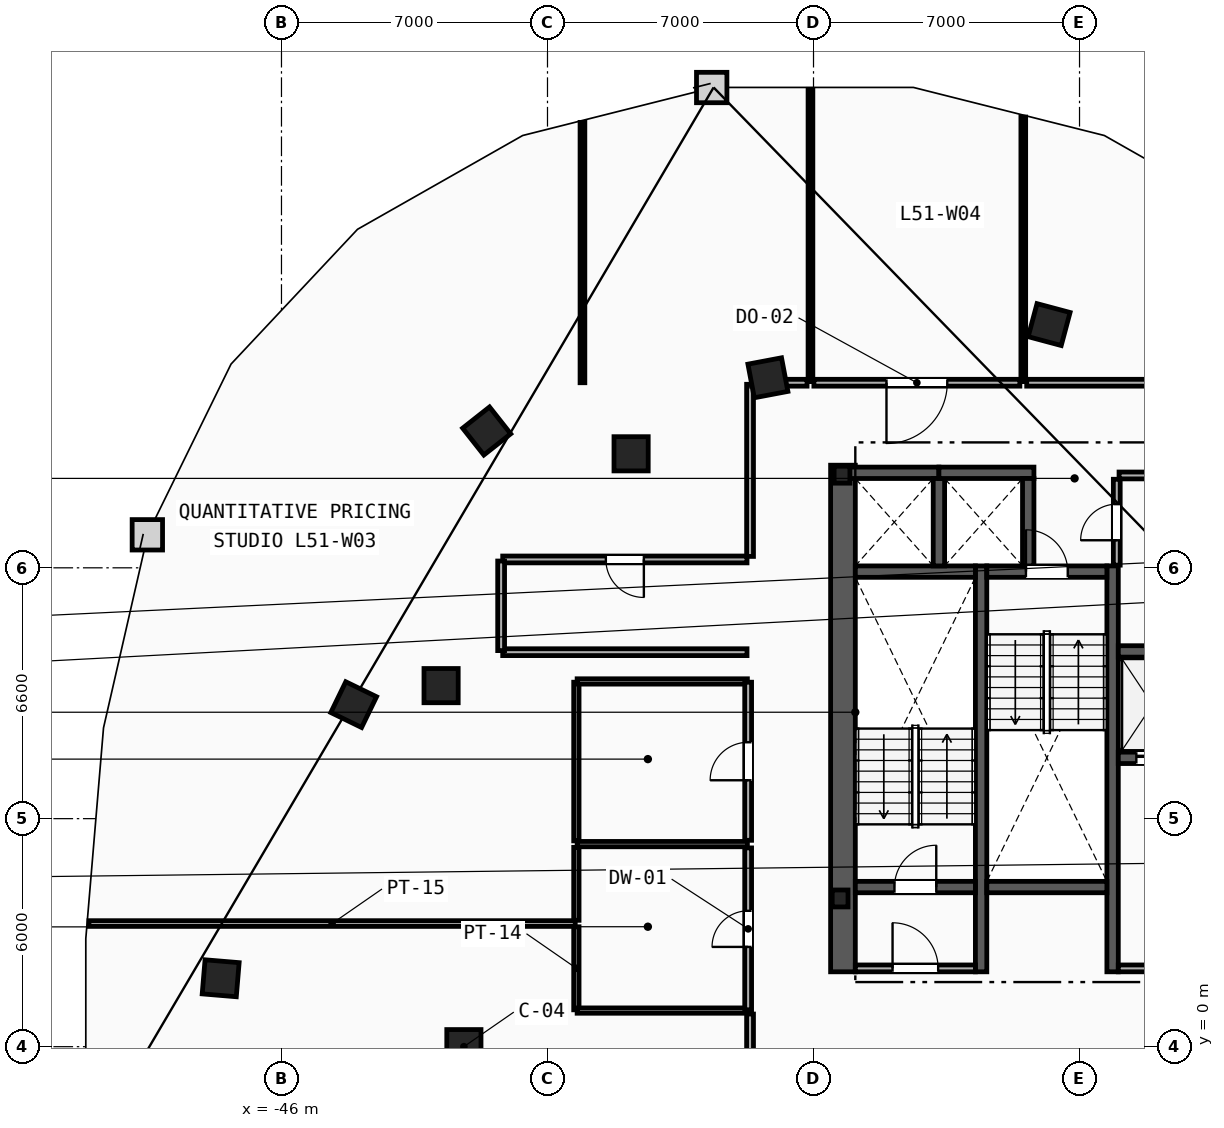
"""IFC4 building model, lengths in metres.
Left out: names, types, materials, properties, quantities, classifications, styles, units other than length and angle.
Written with IfcOpenShell. Run it as: python <this file> out.ifc"""

import sys

from ifc_helpers import new_model, si_unit, direction, frame, frame_2d, origin, origin_2d, place, context, subcontext, project, spatial, rectangle, i_section, extrude, element, fill, save


model = new_model("IFC4")
c1 = context("Model", 3, precision=1e-05, world=origin(), true_north=direction((0.0, 1.0)))
c2 = subcontext(c1, "Body", "Model", "MODEL_VIEW")
j1 = project(units=[si_unit("LENGTHUNIT", "METRE"), si_unit("PLANEANGLEUNIT", "RADIAN")], contexts=[c1])
p1 = place(None, origin())
s1 = spatial("IfcSite", under=j1, at=p1, CompositionType="ELEMENT")
p2 = place(p1, origin())
s2 = spatial("IfcBuilding", under=s1, at=p2, CompositionType="ELEMENT")
p3 = place(p2, frame((0.0, 0.0, 195.4)))
s3 = spatial("IfcBuildingStorey", under=s2, at=p3, CompositionType="ELEMENT", Elevation=195.4)
for number, where, z_axis, x_axis in (
    (1, (-31.3, 3.9, 0.0), (0.0, 0.0, 1.0), (1.0, 0.0, 0.0)),
    (2, (-31.25, 15.05, 0.0), (0.0, 0.0, 1.0), (1.0, 0.0, 0.0)),
):
    element("IfcColumn", number, at=place(p3, frame(where, z_axis=z_axis, x_axis=x_axis)), inside=s3, PredefinedType="COLUMN", context=c2, shape_type="SweptSolid", body=[
        extrude(i_section(OverallWidth=0.416, OverallDepth=0.446, WebThickness=0.039, FlangeThickness=0.063, FilletRadius=0.018, at=origin_2d()), origin(), (0.0, 0.0, 1.0), 3.6),
    ])
for number, where, z_axis, x_axis in (
    (3, (-41.2, 0.0, 0.0), (0.0, 0.0, 1.0), (1.0, 0.0, 0.0)),
    (4, (-41.8, 9.5, 0.0), (0.0, 0.0, 1.0), (1.0, 0.0, 0.0)),
    (5, (-36.8, 15.6, 0.0), (0.0, 0.0, 1.0), (1.0, 0.0, 0.0)),
    (6, (-25.8, 19.0, 0.0), (0.0, 0.0, 1.0), (-0.966, 0.259, 0.0)),
    (7, (-33.2, 17.6, 0.0), (0.0, 0.0, 1.0), (-0.983, -0.186, 0.0)),
    (8, (-40.6, 16.2, 0.0), (0.0, 0.0, 1.0), (-0.785, -0.619, 0.0)),
    (9, (-44.1, 9.0, 0.0), (0.0, 0.0, 1.0), (-0.437, -0.899, 0.0)),
    (10, (-47.6, 1.8, 0.0), (0.0, 0.0, 1.0), (-0.084, -0.997, 0.0)),
):
    element("IfcColumn", number, at=place(p3, frame(where, z_axis=z_axis, x_axis=x_axis)), inside=s3, PredefinedType="COLUMN", context=c2, shape_type="SweptSolid", body=[
        extrude(rectangle(XDim=0.9, YDim=0.9, at=origin_2d()), origin(), (0.0, 0.0, 1.0), 3.6),
    ])
p4 = place(p3, frame((-31.225, 1.97, 0.0), z_axis=(0.0, 0.0, 1.0), x_axis=(0.0, 1.0, 0.0)))
e11 = element("IfcWall", 11, at=p4, inside=s3, PredefinedType="SHEAR", context=c2, shape_type="SweptSolid", body=[
    extrude(rectangle(XDim=13.33, YDim=0.65, at=frame_2d((6.665, 0.0))), origin(), (0.0, 0.0, 1.0), 3.34),
])
for number, where, z_axis, x_axis in (
    (12, (-27.59, 1.97, 0.0), (0.0, 0.0, 1.0), (0.0, 1.0, 0.0)),
    (13, (-24.13, 1.97, 0.0), (0.0, 0.0, 1.0), (0.0, 1.0, 0.0)),
):
    element("IfcWall", number, at=place(p3, frame(where, z_axis=z_axis, x_axis=x_axis)), inside=s3, PredefinedType="SHEAR", context=c2, shape_type="SweptSolid", body=[
        extrude(rectangle(XDim=10.68, YDim=0.3, at=frame_2d((5.34, 0.0))), origin(), (0.0, 0.0, 1.0), 3.34),
    ])
p5 = place(p3, frame((-30.9, 4.2, 0.0), z_axis=(0.0, 0.0, 1.0), x_axis=(1.0, 0.0, 0.0)))
e14 = element("IfcWall", 14, at=p5, inside=s3, PredefinedType="SHEAR", context=c2, shape_type="SweptSolid", body=[
    extrude(rectangle(XDim=3.16, YDim=0.3, at=frame_2d((1.58, 0.0))), origin(), (0.0, 0.0, 1.0), 3.34),
])
p6 = place(p5, frame((1.03, 0.0, 0.0)))
e15 = element("IfcOpeningElement", 15, at=p6, cuts=e14, PredefinedType="OPENING", context=c2, shape_type="SweptSolid", body=[
    extrude(rectangle(XDim=1.1, YDim=2.15, at=frame_2d((0.55, 1.075))), frame((0.0, 0.16, 0.0), z_axis=(0.0, -1.0, 0.0), x_axis=(1.0, 0.0, 0.0)), (0.0, 0.0, 1.0), 0.32),
])
p7 = place(p3, frame((-30.9, 12.5, 0.0), z_axis=(0.0, 0.0, 1.0), x_axis=(1.0, 0.0, 0.0)))
e16 = element("IfcWall", 16, at=p7, inside=s3, PredefinedType="SHEAR", context=c2, shape_type="SweptSolid", body=[
    extrude(rectangle(XDim=3.16, YDim=0.3, at=frame_2d((1.58, 0.0))), origin(), (0.0, 0.0, 1.0), 3.34),
])
p8 = place(p3, frame((-27.44, 12.5, 0.0), z_axis=(0.0, 0.0, 1.0), x_axis=(1.0, 0.0, 0.0)))
e17 = element("IfcWall", 17, at=p8, inside=s3, PredefinedType="SHEAR", context=c2, shape_type="SweptSolid", body=[
    extrude(rectangle(XDim=3.16, YDim=0.3, at=frame_2d((1.58, 0.0))), origin(), (0.0, 0.0, 1.0), 3.34),
])
p9 = place(p8, frame((1.03, 0.0, 0.0)))
e18 = element("IfcOpeningElement", 18, at=p9, cuts=e17, PredefinedType="OPENING", context=c2, shape_type="SweptSolid", body=[
    extrude(rectangle(XDim=1.1, YDim=2.15, at=frame_2d((0.55, 1.075))), frame((0.0, 0.16, 0.0), z_axis=(0.0, -1.0, 0.0), x_axis=(1.0, 0.0, 0.0)), (0.0, 0.0, 1.0), 0.32),
])
p10 = place(p3, frame((-27.44, 4.2, 0.0), z_axis=(0.0, 0.0, 1.0), x_axis=(1.0, 0.0, 0.0)))
e19 = element("IfcWall", 19, at=p10, inside=s3, PredefinedType="SHEAR", context=c2, shape_type="SweptSolid", body=[
    extrude(rectangle(XDim=3.16, YDim=0.3, at=frame_2d((1.58, 0.0))), origin(), (0.0, 0.0, 1.0), 3.34),
])
p11 = place(p3, frame((-23.98, 2.06, 0.0), z_axis=(0.0, 0.0, 1.0), x_axis=(1.0, 0.0, 0.0)))
e20 = element("IfcWall", 20, at=p11, inside=s3, PredefinedType="PARTITIONING", context=c2, shape_type="SweptSolid", body=[
    extrude(rectangle(XDim=3.0, YDim=0.18, at=frame_2d((1.5, 0.0))), origin(), (0.0, 0.0, 1.0), 3.34),
])
p12 = place(p11, frame((0.9, 0.0, 0.0)))
e21 = element("IfcOpeningElement", 21, at=p12, cuts=e20, PredefinedType="OPENING", context=c2, shape_type="SweptSolid", body=[
    extrude(rectangle(XDim=1.2, YDim=2.15, at=frame_2d((0.6, 1.075))), frame((0.0, 0.1, 0.0), z_axis=(0.0, -1.0, 0.0), x_axis=(1.0, 0.0, 0.0)), (0.0, 0.0, 1.0), 0.2),
])
p13 = place(p3, frame((-30.9, 2.06, 0.0), z_axis=(0.0, 0.0, 1.0), x_axis=(1.0, 0.0, 0.0)))
e22 = element("IfcWall", 22, at=p13, inside=s3, PredefinedType="PARTITIONING", context=c2, shape_type="SweptSolid", body=[
    extrude(rectangle(XDim=3.16, YDim=0.18, at=frame_2d((1.58, 0.0))), origin(), (0.0, 0.0, 1.0), 3.34),
])
p14 = place(p13, frame((0.98, 0.0, 0.0)))
e23 = element("IfcOpeningElement", 23, at=p14, cuts=e22, PredefinedType="OPENING", context=c2, shape_type="SweptSolid", body=[
    extrude(rectangle(XDim=1.2, YDim=2.15, at=frame_2d((0.6, 1.075))), frame((0.0, 0.1, 0.0), z_axis=(0.0, -1.0, 0.0), x_axis=(1.0, 0.0, 0.0)), (0.0, 0.0, 1.0), 0.2),
])
p15 = place(p3, frame((-23.98, 7.6, 0.0), z_axis=(0.0, 0.0, 1.0), x_axis=(1.0, 0.0, 0.0)))
e24 = element("IfcWall", 24, at=p15, inside=s3, PredefinedType="SHEAR", context=c2, shape_type="SweptSolid", body=[
    extrude(rectangle(XDim=2.1, YDim=0.3, at=frame_2d((1.05, 0.0))), origin(), (0.0, 0.0, 1.0), 3.34),
])
p16 = place(p15, frame((0.475, 0.0, 0.0)))
e25 = element("IfcOpeningElement", 25, at=p16, cuts=e24, PredefinedType="OPENING", context=c2, shape_type="SweptSolid", body=[
    extrude(rectangle(XDim=1.15, YDim=2.2, at=frame_2d((0.575, 1.1))), frame((0.0, 0.16, 0.0), z_axis=(0.0, -1.0, 0.0), x_axis=(1.0, 0.0, 0.0)), (0.0, 0.0, 1.0), 0.32),
])
p17 = place(p3, frame((-23.98, 10.4, 0.0), z_axis=(0.0, 0.0, 1.0), x_axis=(1.0, 0.0, 0.0)))
e26 = element("IfcWall", 26, at=p17, inside=s3, PredefinedType="SHEAR", context=c2, shape_type="SweptSolid", body=[
    extrude(rectangle(XDim=2.1, YDim=0.3, at=frame_2d((1.05, 0.0))), origin(), (0.0, 0.0, 1.0), 3.34),
])
p18 = place(p3, frame((-31.2, 15.1, 0.0), z_axis=(0.0, 0.0, 1.0), x_axis=(1.0, 0.0, 0.0)))
e27 = element("IfcWall", 27, at=p18, inside=s3, PredefinedType="SHEAR", context=c2, shape_type="SweptSolid", body=[
    extrude(rectangle(XDim=2.5, YDim=0.3, at=frame_2d((1.25, 0.0))), origin(), (0.0, 0.0, 1.0), 3.34),
])
p19 = place(p3, frame((-28.7, 12.65, 0.0), z_axis=(0.0, 0.0, 1.0), x_axis=(0.0, 1.0, 0.0)))
e28 = element("IfcWall", 28, at=p19, inside=s3, PredefinedType="SHEAR", context=c2, shape_type="SweptSolid", body=[
    extrude(rectangle(XDim=2.3, YDim=0.3, at=frame_2d((1.15, 0.0))), origin(), (0.0, 0.0, 1.0), 3.34),
])
p20 = place(p3, frame((-28.7, 15.1, 0.0), z_axis=(0.0, 0.0, 1.0), x_axis=(1.0, 0.0, 0.0)))
e29 = element("IfcWall", 29, at=p20, inside=s3, PredefinedType="SHEAR", context=c2, shape_type="SweptSolid", body=[
    extrude(rectangle(XDim=2.5, YDim=0.3, at=frame_2d((1.25, 0.0))), origin(), (0.0, 0.0, 1.0), 3.34),
])
p21 = place(p3, frame((-26.35, 12.65, 0.0), z_axis=(0.0, 0.0, 1.0), x_axis=(0.0, 1.0, 0.0)))
e30 = element("IfcWall", 30, at=p21, inside=s3, PredefinedType="SHEAR", context=c2, shape_type="SweptSolid", body=[
    extrude(rectangle(XDim=2.3, YDim=0.3, at=frame_2d((1.15, 0.0))), origin(), (0.0, 0.0, 1.0), 3.34),
])
p22 = place(p3, frame((-23.96, 15.03, 0.0), z_axis=(0.0, 0.0, 1.0), x_axis=(1.0, 0.0, 0.0)))
e31 = element("IfcWall", 31, at=p22, inside=s3, PredefinedType="PARTITIONING", context=c2, shape_type="SweptSolid", body=[
    extrude(rectangle(XDim=2.61, YDim=0.18, at=frame_2d((1.305, 0.0))), origin(), (0.0, 0.0, 1.0), 2.413),
])
p23 = place(p3, frame((-24.02, 12.67, 0.0), z_axis=(0.0, 0.0, 1.0), x_axis=(0.0, 1.0, 0.0)))
e32 = element("IfcWall", 32, at=p23, inside=s3, PredefinedType="PARTITIONING", context=c2, shape_type="SweptSolid", body=[
    extrude(rectangle(XDim=2.26, YDim=0.18, at=frame_2d((1.13, 0.0))), origin(), (0.0, 0.0, 1.0), 3.34),
])
p24 = place(p23, frame((0.655, 0.0, 0.0)))
e33 = element("IfcOpeningElement", 33, at=p24, cuts=e32, PredefinedType="OPENING", context=c2, shape_type="SweptSolid", body=[
    extrude(rectangle(XDim=0.95, YDim=2.1, at=frame_2d((0.475, 1.05))), frame((0.0, 0.1, 0.0), z_axis=(0.0, -1.0, 0.0), x_axis=(1.0, 0.0, 0.0)), (0.0, 0.0, 1.0), 0.2),
])
p25 = place(p3, frame((-38.24, 0.97, 0.0), z_axis=(0.0, 0.0, 1.0), x_axis=(0.0, 1.0, 0.0)))
e34 = element("IfcWall", 34, at=p25, inside=s3, PredefinedType="PARTITIONING", context=c2, shape_type="SweptSolid", body=[
    extrude(rectangle(XDim=2.185, YDim=0.14, at=frame_2d((1.093, 0.0))), origin(), (0.0, 0.0, 1.0), 3.34),
])
p26 = place(p3, frame((-38.24, 3.325, 0.0), z_axis=(0.0, 0.0, 1.0), x_axis=(0.0, 1.0, 0.0)))
e35 = element("IfcWall", 35, at=p26, inside=s3, PredefinedType="PARTITIONING", context=c2, shape_type="SweptSolid", body=[
    extrude(rectangle(XDim=1.92, YDim=0.14, at=frame_2d((0.96, 0.0))), origin(), (0.0, 0.0, 1.0), 3.34),
])
p27 = place(p3, frame((-38.24, 5.415, 0.0), z_axis=(0.0, 0.0, 1.0), x_axis=(0.0, 1.0, 0.0)))
e36 = element("IfcWall", 36, at=p27, inside=s3, PredefinedType="PARTITIONING", context=c2, shape_type="SweptSolid", body=[
    extrude(rectangle(XDim=4.175, YDim=0.14, at=frame_2d((2.087, 0.0))), origin(), (0.0, 0.0, 1.0), 3.34),
])
for number, where, z_axis, x_axis in (
    (37, (-38.22, 0.95, 0.0), (0.0, 0.0, 1.0), (1.0, 0.0, 0.0)),
    (38, (-38.22, 5.33, 0.0), (0.0, 0.0, 1.0), (1.0, 0.0, 0.0)),
    (39, (-38.22, 9.61, 0.0), (0.0, 0.0, 1.0), (1.0, 0.0, 0.0)),
):
    element("IfcWall", number, at=place(p3, frame(where, z_axis=z_axis, x_axis=x_axis)), inside=s3, PredefinedType="PARTITIONING", context=c2, shape_type="SweptSolid", body=[
        extrude(rectangle(XDim=4.48, YDim=0.14, at=frame_2d((2.24, 0.0))), origin(), (0.0, 0.0, 1.0), 3.34),
    ])
p28 = place(p3, frame((-33.72, 0.97, 0.0), z_axis=(0.0, 0.0, 1.0), x_axis=(0.0, 1.0, 0.0)))
e40 = element("IfcWall", 40, at=p28, inside=s3, PredefinedType="PARTITIONING", context=c2, shape_type="SweptSolid", body=[
    extrude(rectangle(XDim=4.26, YDim=0.18, at=frame_2d((2.13, 0.0))), origin(), (0.0, 0.0, 1.0), 3.34),
])
p29 = place(p28, frame((1.655, 0.0, 0.0)))
e41 = element("IfcOpeningElement", 41, at=p29, cuts=e40, PredefinedType="OPENING", context=c2, shape_type="SweptSolid", body=[
    extrude(rectangle(XDim=0.95, YDim=2.1, at=frame_2d((0.475, 1.05))), frame((0.0, 0.1, 0.0), z_axis=(0.0, -1.0, 0.0), x_axis=(1.0, 0.0, 0.0)), (0.0, 0.0, 1.0), 0.2),
])
p30 = place(p3, frame((-33.72, 5.43, 0.0), z_axis=(0.0, 0.0, 1.0), x_axis=(0.0, 1.0, 0.0)))
e42 = element("IfcWall", 42, at=p30, inside=s3, PredefinedType="PARTITIONING", context=c2, shape_type="SweptSolid", body=[
    extrude(rectangle(XDim=4.16, YDim=0.18, at=frame_2d((2.08, 0.0))), origin(), (0.0, 0.0, 1.0), 3.34),
])
p31 = place(p30, frame((1.58, 0.0, 0.0)))
e43 = element("IfcOpeningElement", 43, at=p31, cuts=e42, PredefinedType="OPENING", context=c2, shape_type="SweptSolid", body=[
    extrude(rectangle(XDim=1.0, YDim=2.15, at=frame_2d((0.5, 1.075))), frame((0.0, 0.1, 0.0), z_axis=(0.0, -1.0, 0.0), x_axis=(1.0, 0.0, 0.0)), (0.0, 0.0, 1.0), 0.2),
])
p32 = place(p3, frame((-51.066, 3.24, 0.0), z_axis=(0.0, 0.0, 1.0), x_axis=(1.0, 0.0, 0.0)))
e44 = element("IfcWall", 44, at=p32, inside=s3, PredefinedType="PARTITIONING", context=c2, shape_type="SweptSolid", body=[
    extrude(rectangle(XDim=12.796, YDim=0.15, at=frame_2d((6.398, 0.0))), origin(), (0.0, 0.0, 1.0), 3.34),
])
p33 = place(p3, frame((-38.08, 17.47, 0.0), z_axis=(0.0, 0.0, 1.0), x_axis=(0.0, 1.0, 0.0)))
e45 = element("IfcWall", 45, at=p33, inside=s3, PredefinedType="PARTITIONING", context=c2, shape_type="SweptSolid", body=[
    extrude(rectangle(XDim=6.85, YDim=0.125, at=frame_2d((3.425, 0.0))), origin(), (0.0, 0.0, 1.0), 3.34),
])
p34 = place(p3, frame((-32.08, 17.5, 0.0), z_axis=(0.0, 0.0, 1.0), x_axis=(0.0, 1.0, 0.0)))
e46 = element("IfcWall", 46, at=p34, inside=s3, PredefinedType="PARTITIONING", context=c2, shape_type="SweptSolid", body=[
    extrude(rectangle(XDim=7.69, YDim=0.125, at=frame_2d((3.845, 0.0))), origin(), (0.0, 0.0, 1.0), 3.34),
])
p35 = place(p3, frame((-26.48, 17.5, 0.0), z_axis=(0.0, 0.0, 1.0), x_axis=(0.0, 1.0, 0.0)))
e47 = element("IfcWall", 47, at=p35, inside=s3, PredefinedType="PARTITIONING", context=c2, shape_type="SweptSolid", body=[
    extrude(rectangle(XDim=6.961, YDim=0.125, at=frame_2d((3.48, 0.0))), origin(), (0.0, 0.0, 1.0), 3.34),
])
p36 = place(p3, frame((-33.67, 0.859, 0.0), z_axis=(0.0, 0.0, 1.0), x_axis=(0.0, -1.0, 0.0)))
e48 = element("IfcWall", 48, at=p36, inside=s3, PredefinedType="PARTITIONING", context=c2, shape_type="SweptSolid", body=[
    extrude(rectangle(XDim=1.187, YDim=0.18, at=frame_2d((0.594, 0.0))), origin(), (0.0, 0.0, 1.0), 3.34),
])
p37 = place(p3, frame((-16.822, 17.47, 0.0), z_axis=(0.0, 0.0, 1.0), x_axis=(-1.0, 0.0, 0.0)))
e49 = element("IfcWall", 49, at=p37, inside=s3, PredefinedType="PARTITIONING", context=c2, shape_type="SweptSolid", body=[
    extrude(rectangle(XDim=9.568, YDim=0.18, at=frame_2d((4.784, 0.0))), origin(), (0.0, 0.0, 1.0), 3.34),
])
p38 = place(p37, frame((4.284, 0.0, 0.0)))
e50 = element("IfcOpeningElement", 50, at=p38, cuts=e49, PredefinedType="OPENING", context=c2, shape_type="SweptSolid", body=[
    extrude(rectangle(XDim=1.0, YDim=2.15, at=frame_2d((0.5, 1.075))), frame((0.0, 0.1, 0.0), z_axis=(0.0, -1.0, 0.0), x_axis=(1.0, 0.0, 0.0)), (0.0, 0.0, 1.0), 0.2),
])
p39 = place(p3, frame((-33.75, 12.82, 0.0), z_axis=(0.0, 0.0, 1.0), x_axis=(-1.0, 0.0, 0.0)))
e51 = element("IfcWall", 51, at=p39, inside=s3, PredefinedType="PARTITIONING", context=c2, shape_type="SweptSolid", body=[
    extrude(rectangle(XDim=6.428, YDim=0.18, at=frame_2d((3.214, 0.0))), origin(), (0.0, 0.0, 1.0), 3.34),
])
p40 = place(p39, frame((2.714, 0.0, 0.0)))
e52 = element("IfcOpeningElement", 52, at=p40, cuts=e51, PredefinedType="OPENING", context=c2, shape_type="SweptSolid", body=[
    extrude(rectangle(XDim=1.0, YDim=2.15, at=frame_2d((0.5, 1.075))), frame((0.0, 0.1, 0.0), z_axis=(0.0, -1.0, 0.0), x_axis=(1.0, 0.0, 0.0)), (0.0, 0.0, 1.0), 0.2),
])
p41 = place(p3, frame((-40.178, 10.38, 0.0), z_axis=(0.0, 0.0, 1.0), x_axis=(1.0, 0.0, 0.0)))
e53 = element("IfcWall", 53, at=p41, inside=s3, PredefinedType="PARTITIONING", context=c2, shape_type="SweptSolid", body=[
    extrude(rectangle(XDim=6.428, YDim=0.18, at=frame_2d((3.214, 0.0))), origin(), (0.0, 0.0, 1.0), 3.34),
])
p42 = place(p3, frame((-33.67, 17.428, 0.0), z_axis=(0.0, 0.0, 1.0), x_axis=(0.0, -1.0, 0.0)))
e54 = element("IfcWall", 54, at=p42, inside=s3, PredefinedType="PARTITIONING", context=c2, shape_type="SweptSolid", body=[
    extrude(rectangle(XDim=4.529, YDim=0.18, at=frame_2d((2.264, 0.0))), origin(), (0.0, 0.0, 1.0), 3.34),
])
p43 = place(p3, frame((-40.22, 12.779, 0.0), z_axis=(0.0, 0.0, 1.0), x_axis=(0.0, -1.0, 0.0)))
e55 = element("IfcWall", 55, at=p43, inside=s3, PredefinedType="PARTITIONING", context=c2, shape_type="SweptSolid", body=[
    extrude(rectangle(XDim=2.357, YDim=0.18, at=frame_2d((1.179, 0.0))), origin(), (0.0, 0.0, 1.0), 3.34),
])
p44 = place(p3, frame((-32.17, 17.47, 0.0), z_axis=(0.0, 0.0, 1.0), x_axis=(-1.0, 0.0, 0.0)))
e56 = element("IfcWall", 56, at=p44, inside=s3, PredefinedType="PARTITIONING", context=c2, shape_type="SweptSolid", body=[
    extrude(rectangle(XDim=1.458, YDim=0.18, at=frame_2d((0.729, 0.0))), origin(), (0.0, 0.0, 1.0), 3.34),
])
p45 = place(p3, frame((-26.57, 17.47, 0.0), z_axis=(0.0, 0.0, 1.0), x_axis=(-1.0, 0.0, 0.0)))
e57 = element("IfcWall", 57, at=p45, inside=s3, PredefinedType="PARTITIONING", context=c2, shape_type="SweptSolid", body=[
    extrude(rectangle(XDim=5.42, YDim=0.18, at=frame_2d((2.71, 0.0))), origin(), (0.0, 0.0, 1.0), 3.34),
])
p46 = place(p45, frame((1.91, 0.0, 0.0)))
e58 = element("IfcOpeningElement", 58, at=p46, cuts=e57, PredefinedType="OPENING", context=c2, shape_type="SweptSolid", body=[
    extrude(rectangle(XDim=1.6, YDim=2.2, at=frame_2d((0.8, 1.1))), frame((0.0, 0.1, 0.0), z_axis=(0.0, -1.0, 0.0), x_axis=(1.0, 0.0, 0.0)), (0.0, 0.0, 1.0), 0.2),
])
p47 = place(p6, origin())
e59 = element("IfcDoor", 59, at=p47, inside=s3, OperationType="SINGLE_SWING_RIGHT", PredefinedType="DOOR", context=c2, shape_type="SweptSolid", body=[
    extrude(rectangle(XDim=1.1, YDim=2.15, at=frame_2d((0.55, 1.075))), frame((0.0, 0.025, 0.0), z_axis=(0.0, -1.0, 0.0), x_axis=(1.0, 0.0, 0.0)), (0.0, 0.0, 1.0), 0.05),
])
fill(e15, e59)
p48 = place(p9, origin())
e60 = element("IfcDoor", 60, at=p48, inside=s3, OperationType="SINGLE_SWING_LEFT", PredefinedType="DOOR", context=c2, shape_type="SweptSolid", body=[
    extrude(rectangle(XDim=1.1, YDim=2.15, at=frame_2d((0.55, 1.075))), frame((0.0, 0.025, 0.0), z_axis=(0.0, -1.0, 0.0), x_axis=(1.0, 0.0, 0.0)), (0.0, 0.0, 1.0), 0.05),
])
fill(e18, e60)
p49 = place(p14, origin())
e61 = element("IfcDoor", 61, at=p49, inside=s3, OperationType="SINGLE_SWING_LEFT", PredefinedType="DOOR", context=c2, shape_type="SweptSolid", body=[
    extrude(rectangle(XDim=1.2, YDim=2.15, at=frame_2d((0.6, 1.075))), frame((0.0, 0.025, 0.0), z_axis=(0.0, -1.0, 0.0), x_axis=(1.0, 0.0, 0.0)), (0.0, 0.0, 1.0), 0.05),
])
fill(e23, e61)
p50 = place(p16, origin())
e62 = element("IfcDoor", 62, at=p50, inside=s3, OperationType="SLIDING_TO_LEFT", PredefinedType="TRAPDOOR", context=c2, shape_type="SweptSolid", body=[
    extrude(rectangle(XDim=1.15, YDim=2.2, at=frame_2d((0.575, 1.1))), frame((0.0, 0.025, 0.0), z_axis=(0.0, -1.0, 0.0), x_axis=(1.0, 0.0, 0.0)), (0.0, 0.0, 1.0), 0.05),
])
fill(e25, e62)
p51 = place(p40, origin())
e63 = element("IfcDoor", 63, at=p51, inside=s3, OperationType="SINGLE_SWING_LEFT", PredefinedType="DOOR", context=c2, shape_type="SweptSolid", body=[
    extrude(rectangle(XDim=1.0, YDim=2.15, at=frame_2d((0.5, 1.075))), frame((0.0, 0.025, 0.0), z_axis=(0.0, -1.0, 0.0), x_axis=(1.0, 0.0, 0.0)), (0.0, 0.0, 1.0), 0.05),
])
fill(e52, e63)
p52 = place(p46, origin())
e64 = element("IfcDoor", 64, at=p52, inside=s3, OperationType="SINGLE_SWING_RIGHT", PredefinedType="DOOR", context=c2, shape_type="SweptSolid", body=[
    extrude(rectangle(XDim=1.6, YDim=2.2, at=frame_2d((0.8, 1.1))), frame((0.0, 0.025, 0.0), z_axis=(0.0, -1.0, 0.0), x_axis=(1.0, 0.0, 0.0)), (0.0, 0.0, 1.0), 0.05),
])
fill(e58, e64)
p53 = place(p29, origin())
e65 = element("IfcDoor", 65, at=p53, inside=s3, OperationType="SINGLE_SWING_LEFT", PredefinedType="DOOR", context=c2, shape_type="SweptSolid", body=[
    extrude(rectangle(XDim=0.95, YDim=2.1, at=frame_2d((0.475, 1.05))), frame((0.0, 0.025, 0.0), z_axis=(0.0, -1.0, 0.0), x_axis=(1.0, 0.0, 0.0)), (0.0, 0.0, 1.0), 0.05),
])
fill(e41, e65)
p54 = place(p31, origin())
e66 = element("IfcDoor", 66, at=p54, inside=s3, OperationType="SINGLE_SWING_LEFT", PredefinedType="DOOR", context=c2, shape_type="SweptSolid", body=[
    extrude(rectangle(XDim=1.0, YDim=2.15, at=frame_2d((0.5, 1.075))), frame((0.0, 0.025, 0.0), z_axis=(0.0, -1.0, 0.0), x_axis=(1.0, 0.0, 0.0)), (0.0, 0.0, 1.0), 0.05),
])
fill(e43, e66)
p55 = place(p24, origin())
e67 = element("IfcDoor", 67, at=p55, inside=s3, OperationType="SINGLE_SWING_LEFT", PredefinedType="DOOR", context=c2, shape_type="SweptSolid", body=[
    extrude(rectangle(XDim=0.95, YDim=2.1, at=frame_2d((0.475, 1.05))), frame((0.0, 0.025, 0.0), z_axis=(0.0, -1.0, 0.0), x_axis=(1.0, 0.0, 0.0)), (0.0, 0.0, 1.0), 0.05),
])
fill(e33, e67)
save(model, sys.argv[1])
